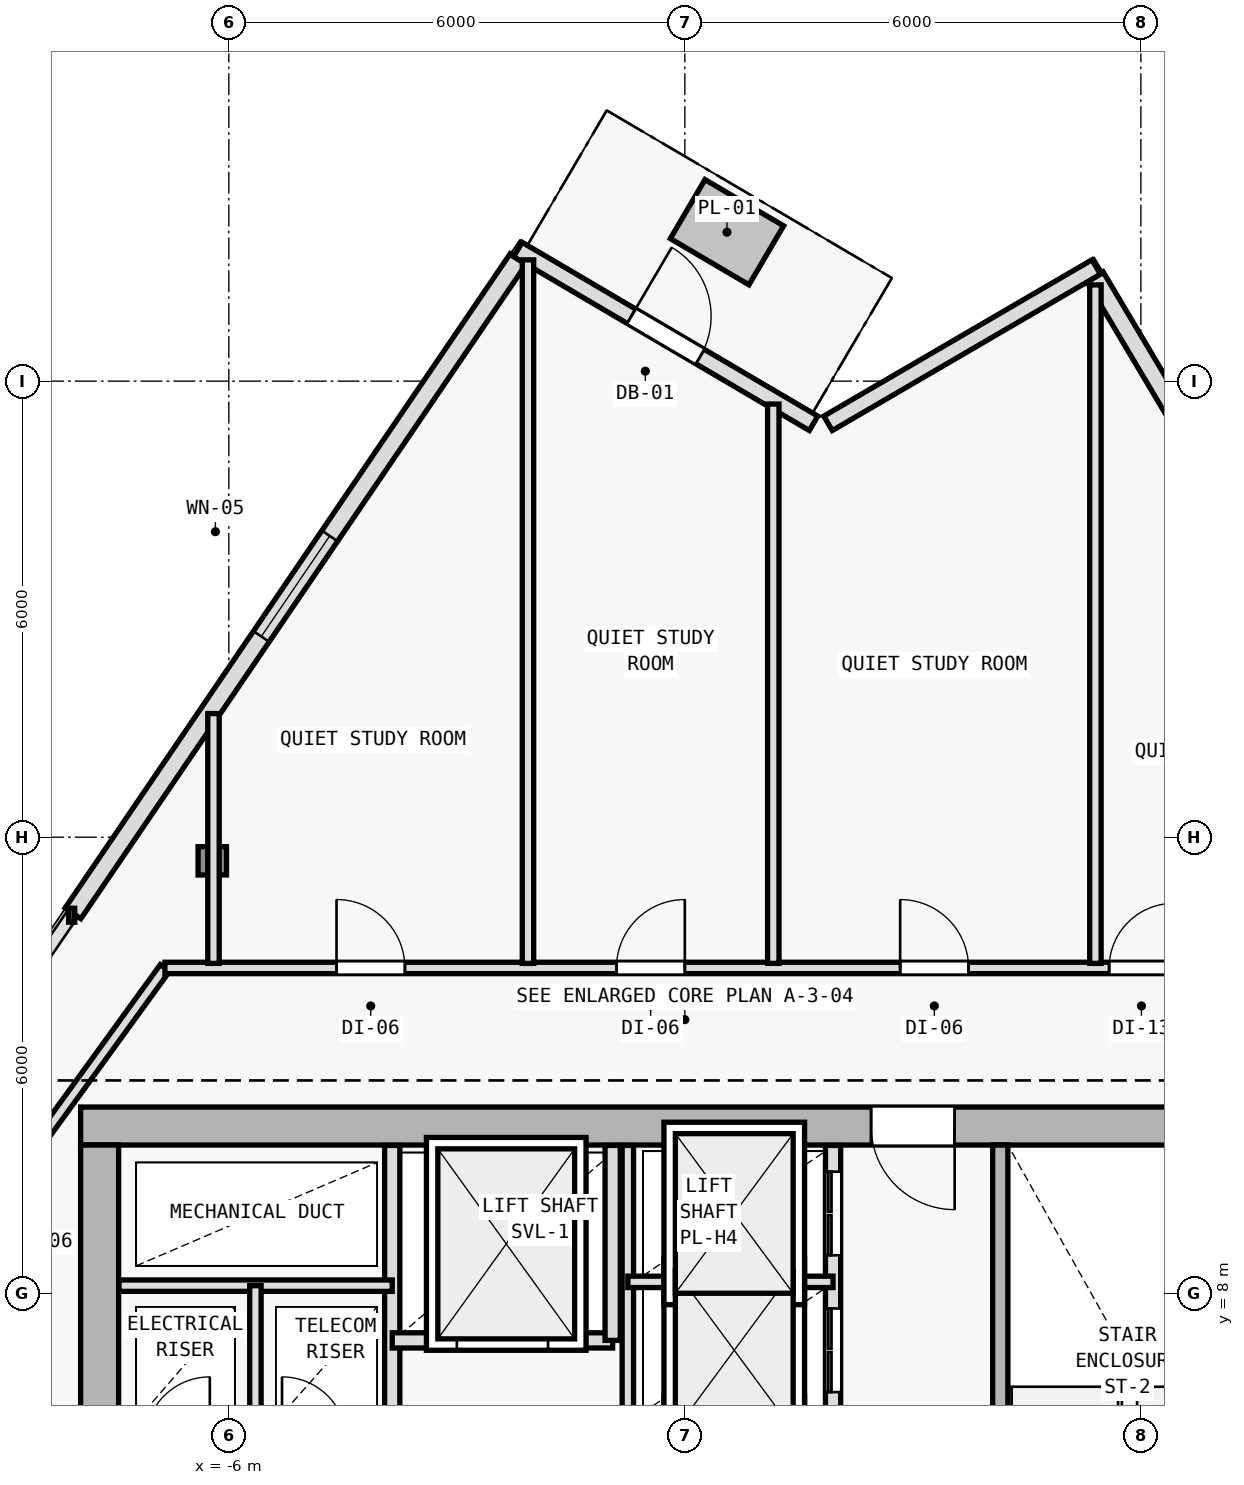
"""IFC4 building model, lengths in metres.
Left out: names, types, materials, properties, quantities, classifications, styles, units other than length and angle.
Written with IfcOpenShell. Run it as: python <this file> out.ifc"""

import sys

from ifc_helpers import new_model, si_unit, direction, frame, frame_2d, origin, origin_2d, place, context, subcontext, project, spatial, rectangle, i_section, extrude, element, fill, save


model = new_model("IFC4")
c1 = context("Model", 3, precision=1e-05, world=origin(), true_north=direction((0.0, 1.0)))
c2 = subcontext(c1, "Body", "Model", "MODEL_VIEW")
j1 = project(units=[si_unit("LENGTHUNIT", "METRE"), si_unit("PLANEANGLEUNIT", "RADIAN")], contexts=[c1])
p1 = place(None, origin())
s1 = spatial("IfcSite", under=j1, at=p1, CompositionType="ELEMENT")
p2 = place(p1, origin())
s2 = spatial("IfcBuilding", under=s1, at=p2, CompositionType="ELEMENT")
p3 = place(p2, frame((0.0, 0.0, 234.3)))
s3 = spatial("IfcBuildingStorey", under=s2, at=p3, CompositionType="ELEMENT", Elevation=234.3)
p4 = place(p3, frame((-7.7, 10.2, 0.0), z_axis=(0.0, 0.0, 1.0), x_axis=(1.0, 0.0, 0.0)))
e1 = element("IfcColumn", 1, at=p4, inside=s3, PredefinedType="COLUMN", context=c2, shape_type="SweptSolid", body=[
    extrude(i_section(OverallWidth=0.398, OverallDepth=0.387, WebThickness=0.013, FlangeThickness=0.022, FilletRadius=0.015, at=origin_2d()), origin(), (0.0, 0.0, 1.0), 3.6),
])
p5 = place(p3, frame((-6.218, 13.689, 0.005), z_axis=(0.008774546149, -0.002584750028, 0.999958162328), x_axis=(0.282568886397, 0.959247009086, 0.0)))
e2 = element("IfcColumn", 2, at=p5, inside=s3, PredefinedType="COLUMN", context=c2, shape_type="SweptSolid", body=[
    extrude(i_section(OverallWidth=0.374, OverallDepth=0.372, WebThickness=0.012, FlangeThickness=0.02, FilletRadius=0.015, at=origin_2d()), origin(), (0.0, 0.0, 1.0), 3.589),
])
p6 = place(p3, frame((5.396, 21.375, 0.0), z_axis=(0.0, 0.0, 1.0), x_axis=(0.511082771111, -0.85953150092, 0.0)))
e3 = element("IfcWall", 3, at=p6, inside=s3, PredefinedType="SOLIDWALL", context=c2, shape_type="SweptSolid", body=[
    extrude(rectangle(XDim=9.911, YDim=0.25, at=frame_2d((4.955, 0.0))), origin(), (0.0, 0.0, 1.0), 3.35),
])
p7 = place(p6, frame((4.505, 0.0, 0.62)))
e4 = element("IfcOpeningElement", 4, at=p7, cuts=e3, PredefinedType="OPENING", context=c2, shape_type="SweptSolid", body=[
    extrude(rectangle(XDim=0.9, YDim=1.6, at=frame_2d((0.45, 0.8))), frame((0.0, 0.135, 0.0), z_axis=(0.0, -1.0, 0.0), x_axis=(1.0, 0.0, 0.0)), (0.0, 0.0, 1.0), 0.27),
])
p8 = place(p3, frame((-8.05, 12.998, 0.0), z_axis=(0.0, 0.0, 1.0), x_axis=(0.562447281182, 0.826833148762, 0.0)))
e5 = element("IfcWall", 5, at=p8, inside=s3, PredefinedType="SOLIDWALL", context=c2, shape_type="SweptSolid", body=[
    extrude(rectangle(XDim=10.411, YDim=0.25, at=frame_2d((5.205, 0.0))), origin(), (0.0, 0.0, 1.0), 3.35),
])
p9 = place(p8, frame((4.405, 0.0, 0.62)))
e6 = element("IfcOpeningElement", 6, at=p9, cuts=e5, PredefinedType="OPENING", context=c2, shape_type="SweptSolid", body=[
    extrude(rectangle(XDim=1.6, YDim=2.1, at=frame_2d((0.8, 1.05))), frame((0.0, 0.135, 0.0), z_axis=(0.0, -1.0, 0.0), x_axis=(1.0, 0.0, 0.0)), (0.0, 0.0, 1.0), 0.27),
])
p10 = place(p3, frame((1.884, 19.445, 0.0), z_axis=(0.0, 0.0, 1.0), x_axis=(0.863969645804, 0.50354389196, 0.0)))
e7 = element("IfcWall", 7, at=p10, inside=s3, PredefinedType="SOLIDWALL", context=c2, shape_type="SweptSolid", body=[
    extrude(rectangle(XDim=4.084, YDim=0.22, at=frame_2d((2.042, 0.0))), origin(), (0.0, 0.0, 1.0), 3.35),
])
p11 = place(p3, frame((-2.197, 21.732, 0.0), z_axis=(0.0, 0.0, 1.0), x_axis=(0.862121926844, -0.506700881442, 0.0)))
e8 = element("IfcWall", 8, at=p11, inside=s3, PredefinedType="SOLIDWALL", context=c2, shape_type="SweptSolid", body=[
    extrude(rectangle(XDim=4.512, YDim=0.22, at=frame_2d((2.256, 0.0))), origin(), (0.0, 0.0, 1.0), 3.35),
])
p12 = place(p11, frame((1.731, 0.0, 0.0)))
e9 = element("IfcOpeningElement", 9, at=p12, cuts=e8, PredefinedType="OPENING", context=c2, shape_type="SweptSolid", body=[
    extrude(rectangle(XDim=1.05, YDim=2.15, at=frame_2d((0.525, 1.075))), frame((0.0, 0.12, 0.0), z_axis=(0.0, -1.0, 0.0), x_axis=(1.0, 0.0, 0.0)), (0.0, 0.0, 1.0), 0.24),
])
p13 = place(p3, frame((7.95, 10.2, 0.0), z_axis=(0.0, 0.0, 1.0), x_axis=(-1.0, 0.0, 0.0)))
e10 = element("IfcWall", 10, at=p13, inside=s3, PredefinedType="SHEAR", context=c2, shape_type="SweptSolid", body=[
    extrude(rectangle(XDim=15.9, YDim=0.5, at=frame_2d((7.95, 0.0))), origin(), (0.0, 0.0, 1.0), 3.35),
])
p14 = place(p13, frame((4.4, 0.0, 0.0)))
e11 = element("IfcOpeningElement", 11, at=p14, cuts=e10, PredefinedType="OPENING", context=c2, shape_type="SweptSolid", body=[
    extrude(rectangle(XDim=1.1, YDim=2.15, at=frame_2d((0.55, 1.075))), frame((0.0, 0.26, 0.0), z_axis=(0.0, -1.0, 0.0), x_axis=(1.0, 0.0, 0.0)), (0.0, 0.0, 1.0), 0.52),
])
p15 = place(p3, frame((-7.7, -9.15, 0.0), z_axis=(0.0, 0.0, 1.0), x_axis=(0.0, 1.0, 0.0)))
e12 = element("IfcWall", 12, at=p15, inside=s3, PredefinedType="SHEAR", context=c2, shape_type="SweptSolid", body=[
    extrude(rectangle(XDim=19.1, YDim=0.5, at=frame_2d((9.55, 0.0))), origin(), (0.0, 0.0, 1.0), 3.35),
])
p16 = place(p15, frame((12.7, 0.0, 0.0)))
e13 = element("IfcOpeningElement", 13, at=p16, cuts=e12, PredefinedType="OPENING", context=c2, shape_type="SweptSolid", body=[
    extrude(rectangle(XDim=1.1, YDim=2.15, at=frame_2d((0.55, 1.075))), frame((0.0, 0.26, 0.0), z_axis=(0.0, -1.0, 0.0), x_axis=(1.0, 0.0, 0.0)), (0.0, 0.0, 1.0), 0.52),
])
p17 = place(p3, frame((-3.85, 1.35, 0.0), z_axis=(0.0, 0.0, 1.0), x_axis=(0.0, 1.0, 0.0)))
e14 = element("IfcWall", 14, at=p17, inside=s3, PredefinedType="SOLIDWALL", context=c2, shape_type="SweptSolid", body=[
    extrude(rectangle(XDim=8.595, YDim=0.2, at=frame_2d((4.297, 0.0))), origin(), (0.0, 0.0, 1.0), 3.35),
])
p18 = place(p17, frame((1.5, 0.0, 0.0)))
e15 = element("IfcOpeningElement", 15, at=p18, cuts=e14, PredefinedType="OPENING", context=c2, shape_type="SweptSolid", body=[
    extrude(rectangle(XDim=1.0, YDim=2.15, at=frame_2d((0.5, 1.075))), frame((0.0, 0.11, 0.0), z_axis=(0.0, -1.0, 0.0), x_axis=(1.0, 0.0, 0.0)), (0.0, 0.0, 1.0), 0.22),
])
p19 = place(p17, frame((3.18, 0.0, 0.0)))
e16 = element("IfcOpeningElement", 16, at=p19, cuts=e14, PredefinedType="OPENING", context=c2, shape_type="SweptSolid", body=[
    extrude(rectangle(XDim=1.0, YDim=2.15, at=frame_2d((0.5, 1.075))), frame((0.0, 0.11, 0.0), z_axis=(0.0, -1.0, 0.0), x_axis=(1.0, 0.0, 0.0)), (0.0, 0.0, 1.0), 0.22),
])
p20 = place(p3, frame((-7.445, 8.1, 0.0), z_axis=(0.0, 0.0, 1.0), x_axis=(1.0, 0.0, 0.0)))
e17 = element("IfcWall", 17, at=p20, inside=s3, PredefinedType="PARTITIONING", context=c2, shape_type="SweptSolid", body=[
    extrude(rectangle(XDim=3.595, YDim=0.15, at=frame_2d((1.797, 0.0))), origin(), (0.0, 0.0, 1.0), 3.35),
])
p21 = place(p3, frame((-5.65, 6.05, 0.0), z_axis=(0.0, 0.0, 1.0), x_axis=(0.0, 1.0, 0.0)))
e18 = element("IfcWall", 18, at=p21, inside=s3, PredefinedType="PARTITIONING", context=c2, shape_type="SweptSolid", body=[
    extrude(rectangle(XDim=2.05, YDim=0.15, at=frame_2d((1.025, 0.0))), origin(), (0.0, 0.0, 1.0), 3.35),
])
p22 = place(p3, frame((4.15, 2.75, 0.0), z_axis=(0.0, 0.0, 1.0), x_axis=(0.0, 1.0, 0.0)))
e19 = element("IfcWall", 19, at=p22, inside=s3, PredefinedType="SOLIDWALL", context=c2, shape_type="SweptSolid", body=[
    extrude(rectangle(XDim=7.2, YDim=0.2, at=frame_2d((3.6, 0.0))), origin(), (0.0, 0.0, 1.0), 3.35),
])
p23 = place(p22, frame((0.35, 0.0, 0.0)))
e20 = element("IfcOpeningElement", 20, at=p23, cuts=e19, PredefinedType="OPENING", context=c2, shape_type="SweptSolid", body=[
    extrude(rectangle(XDim=1.0, YDim=2.15, at=frame_2d((0.5, 1.075))), frame((0.0, 0.11, 0.0), z_axis=(0.0, -1.0, 0.0), x_axis=(1.0, 0.0, 0.0)), (0.0, 0.0, 1.0), 0.22),
])
p24 = place(p3, frame((-3.85, 7.38, 0.0), z_axis=(0.0, 0.0, 1.0), x_axis=(1.0, 0.0, 0.0)))
e21 = element("IfcWall", 21, at=p24, inside=s3, PredefinedType="SOLIDWALL", context=c2, shape_type="SweptSolid", body=[
    extrude(rectangle(XDim=2.9, YDim=0.2, at=frame_2d((1.45, 0.0))), origin(), (0.0, 0.0, 1.0), 3.35),
])
p25 = place(p24, frame((0.85, 0.0, 0.0)))
e22 = element("IfcOpeningElement", 22, at=p25, cuts=e21, PredefinedType="OPENING", context=c2, shape_type="SweptSolid", body=[
    extrude(rectangle(XDim=1.2, YDim=2.2, at=frame_2d((0.6, 1.1))), frame((0.0, 0.11, 0.0), z_axis=(0.0, -1.0, 0.0), x_axis=(1.0, 0.0, 0.0)), (0.0, 0.0, 1.0), 0.22),
])
p26 = place(p3, frame((-0.95, 7.38, 0.0), z_axis=(0.0, 0.0, 1.0), x_axis=(0.0, 1.0, 0.0)))
e23 = element("IfcWall", 23, at=p26, inside=s3, PredefinedType="SOLIDWALL", context=c2, shape_type="SweptSolid", body=[
    extrude(rectangle(XDim=2.565, YDim=0.2, at=frame_2d((1.283, 0.0))), origin(), (0.0, 0.0, 1.0), 3.35),
])
p27 = place(p3, frame((1.95, 2.65, 0.0), z_axis=(0.0, 0.0, 1.0), x_axis=(0.0, 1.0, 0.0)))
e24 = element("IfcWall", 24, at=p27, inside=s3, PredefinedType="SOLIDWALL", context=c2, shape_type="SweptSolid", body=[
    extrude(rectangle(XDim=7.295, YDim=0.2, at=frame_2d((3.647, 0.0))), origin(), (0.0, 0.0, 1.0), 3.35),
])
p28 = place(p27, frame((0.45, 0.0, 0.0)))
e25 = element("IfcOpeningElement", 25, at=p28, cuts=e24, PredefinedType="OPENING", context=c2, shape_type="SweptSolid", body=[
    extrude(rectangle(XDim=1.1, YDim=2.15, at=frame_2d((0.55, 1.075))), frame((0.0, 0.11, 0.0), z_axis=(0.0, -1.0, 0.0), x_axis=(1.0, 0.0, 0.0)), (0.0, 0.0, 1.0), 0.22),
])
p29 = place(p27, frame((2.25, 0.0, 0.0)))
e26 = element("IfcOpeningElement", 26, at=p29, cuts=e24, PredefinedType="OPENING", context=c2, shape_type="SweptSolid", body=[
    extrude(rectangle(XDim=1.1, YDim=2.15, at=frame_2d((0.55, 1.075))), frame((0.0, 0.11, 0.0), z_axis=(0.0, -1.0, 0.0), x_axis=(1.0, 0.0, 0.0)), (0.0, 0.0, 1.0), 0.22),
])
p30 = place(p27, frame((4.05, 0.0, 0.0)))
e27 = element("IfcOpeningElement", 27, at=p30, cuts=e24, PredefinedType="OPENING", context=c2, shape_type="SweptSolid", body=[
    extrude(rectangle(XDim=1.1, YDim=2.15, at=frame_2d((0.55, 1.075))), frame((0.0, 0.11, 0.0), z_axis=(0.0, -1.0, 0.0), x_axis=(1.0, 0.0, 0.0)), (0.0, 0.0, 1.0), 0.22),
])
p31 = place(p27, frame((5.85, 0.0, 0.0)))
e28 = element("IfcOpeningElement", 28, at=p31, cuts=e24, PredefinedType="OPENING", context=c2, shape_type="SweptSolid", body=[
    extrude(rectangle(XDim=1.1, YDim=2.15, at=frame_2d((0.55, 1.075))), frame((0.0, 0.11, 0.0), z_axis=(0.0, -1.0, 0.0), x_axis=(1.0, 0.0, 0.0)), (0.0, 0.0, 1.0), 0.22),
])
p32 = place(p3, frame((-0.75, 5.92, 0.0), z_axis=(0.0, 0.0, 1.0), x_axis=(0.0, 1.0, 0.0)))
e29 = element("IfcWall", 29, at=p32, inside=s3, PredefinedType="PARTITIONING", context=c2, shape_type="SweptSolid", body=[
    extrude(rectangle(XDim=4.025, YDim=0.15, at=frame_2d((2.013, 0.0))), origin(), (0.0, 0.0, 1.0), 3.35),
])
p33 = place(p3, frame((-0.75, 8.15, 0.0), z_axis=(0.0, 0.0, 1.0), x_axis=(1.0, 0.0, 0.0)))
e30 = element("IfcWall", 30, at=p33, inside=s3, PredefinedType="PARTITIONING", context=c2, shape_type="SweptSolid", body=[
    extrude(rectangle(XDim=2.7, YDim=0.15, at=frame_2d((1.35, 0.0))), origin(), (0.0, 0.0, 1.0), 3.35),
])
p34 = place(p3, frame((-9.78, 8.226, 0.0), z_axis=(0.0, 0.0, 1.0), x_axis=(0.586956386413, 0.809618552436, 0.0)))
e31 = element("IfcWall", 31, at=p34, inside=s3, PredefinedType="PARTITIONING", context=c2, shape_type="SweptSolid", body=[
    extrude(rectangle(XDim=5.008, YDim=0.15, at=frame_2d((2.504, 0.0))), origin(), (0.0, 0.0, 1.0), 2.975),
])
p35 = place(p34, frame((1.154, 0.0, 0.0)))
e32 = element("IfcOpeningElement", 32, at=p35, cuts=e31, PredefinedType="OPENING", context=c2, shape_type="SweptSolid", body=[
    extrude(rectangle(XDim=0.9, YDim=2.1, at=frame_2d((0.45, 1.05))), frame((0.0, 0.085, 0.0), z_axis=(0.0, -1.0, 0.0), x_axis=(1.0, 0.0, 0.0)), (0.0, 0.0, 1.0), 0.17),
])
p36 = place(p3, frame((-6.841, 12.28, 0.0), z_axis=(0.0, 0.0, 1.0), x_axis=(1.0, 0.0, 0.0)))
e33 = element("IfcWall", 33, at=p36, inside=s3, PredefinedType="PARTITIONING", context=c2, shape_type="SweptSolid", body=[
    extrude(rectangle(XDim=13.682, YDim=0.15, at=frame_2d((6.841, 0.0))), origin(), (0.0, 0.0, 1.0), 2.975),
])
p37 = place(p36, frame((12.423, 0.0, 0.0)))
e34 = element("IfcOpeningElement", 34, at=p37, cuts=e33, PredefinedType="OPENING", context=c2, shape_type="SweptSolid", body=[
    extrude(rectangle(XDim=0.85, YDim=2.1, at=frame_2d((0.425, 1.05))), frame((0.0, 0.085, 0.0), z_axis=(0.0, -1.0, 0.0), x_axis=(1.0, 0.0, 0.0)), (0.0, 0.0, 1.0), 0.17),
])
p38 = place(p36, frame((9.674, 0.0, 0.0)))
e35 = element("IfcOpeningElement", 35, at=p38, cuts=e33, PredefinedType="OPENING", context=c2, shape_type="SweptSolid", body=[
    extrude(rectangle(XDim=0.9, YDim=2.1, at=frame_2d((0.45, 1.05))), frame((0.0, 0.085, 0.0), z_axis=(0.0, -1.0, 0.0), x_axis=(1.0, 0.0, 0.0)), (0.0, 0.0, 1.0), 0.17),
])
p39 = place(p36, frame((5.941, 0.0, 0.0)))
e36 = element("IfcOpeningElement", 36, at=p39, cuts=e33, PredefinedType="OPENING", context=c2, shape_type="SweptSolid", body=[
    extrude(rectangle(XDim=0.9, YDim=2.1, at=frame_2d((0.45, 1.05))), frame((0.0, 0.085, 0.0), z_axis=(0.0, -1.0, 0.0), x_axis=(1.0, 0.0, 0.0)), (0.0, 0.0, 1.0), 0.17),
])
p40 = place(p36, frame((2.258, 0.0, 0.0)))
e37 = element("IfcOpeningElement", 37, at=p40, cuts=e33, PredefinedType="OPENING", context=c2, shape_type="SweptSolid", body=[
    extrude(rectangle(XDim=0.9, YDim=2.1, at=frame_2d((0.45, 1.05))), frame((0.0, 0.085, 0.0), z_axis=(0.0, -1.0, 0.0), x_axis=(1.0, 0.0, 0.0)), (0.0, 0.0, 1.0), 0.17),
])
p41 = place(p3, frame((-6.202, 12.34, 0.0), z_axis=(0.0, 0.0, 1.0), x_axis=(0.0, 1.0, 0.0)))
e38 = element("IfcWall", 38, at=p41, inside=s3, PredefinedType="PARTITIONING", context=c2, shape_type="SweptSolid", body=[
    extrude(rectangle(XDim=3.287, YDim=0.15, at=frame_2d((1.644, 0.0))), origin(), (0.0, 0.0, 1.0), 2.975),
])
p42 = place(p3, frame((1.164, 12.34, 0.0), z_axis=(0.0, 0.0, 1.0), x_axis=(0.0, 1.0, 0.0)))
e39 = element("IfcWall", 39, at=p42, inside=s3, PredefinedType="PARTITIONING", context=c2, shape_type="SweptSolid", body=[
    extrude(rectangle(XDim=7.359, YDim=0.15, at=frame_2d((3.679, 0.0))), origin(), (0.0, 0.0, 1.0), 2.975),
])
p43 = place(p3, frame((5.402, 12.34, 0.0), z_axis=(0.0, 0.0, 1.0), x_axis=(0.0, 1.0, 0.0)))
e40 = element("IfcWall", 40, at=p43, inside=s3, PredefinedType="PARTITIONING", context=c2, shape_type="SweptSolid", body=[
    extrude(rectangle(XDim=8.926, YDim=0.15, at=frame_2d((4.463, 0.0))), origin(), (0.0, 0.0, 1.0), 2.975),
])
p44 = place(p3, frame((-2.064, 12.34, 0.0), z_axis=(0.0, 0.0, 1.0), x_axis=(0.0, 1.0, 0.0)))
e41 = element("IfcWall", 41, at=p44, inside=s3, PredefinedType="PARTITIONING", context=c2, shape_type="SweptSolid", body=[
    extrude(rectangle(XDim=9.256, YDim=0.15, at=frame_2d((4.628, 0.0))), origin(), (0.0, 0.0, 1.0), 2.975),
])
p45 = place(p9, origin())
e42 = element("IfcWindow", 42, at=p45, inside=s3, PartitioningType="SINGLE_PANEL", PredefinedType="WINDOW", context=c2, shape_type="SweptSolid", body=[
    extrude(rectangle(XDim=1.6, YDim=2.1, at=frame_2d((0.8, 1.05))), frame((0.0, 0.03, 0.0), z_axis=(0.0, -1.0, 0.0), x_axis=(1.0, 0.0, 0.0)), (0.0, 0.0, 1.0), 0.06),
])
fill(e6, e42)
p46 = place(p12, origin())
e43 = element("IfcDoor", 43, at=p46, inside=s3, OperationType="SINGLE_SWING_LEFT", PredefinedType="DOOR", context=c2, shape_type="SweptSolid", body=[
    extrude(rectangle(XDim=1.05, YDim=2.15, at=frame_2d((0.525, 1.075))), frame((0.0, 0.025, 0.0), z_axis=(0.0, -1.0, 0.0), x_axis=(1.0, 0.0, 0.0)), (0.0, 0.0, 1.0), 0.05),
])
fill(e9, e43)
p47 = place(p14, origin())
e44 = element("IfcDoor", 44, at=p47, inside=s3, OperationType="SINGLE_SWING_LEFT", PredefinedType="DOOR", context=c2, shape_type="SweptSolid", body=[
    extrude(rectangle(XDim=1.1, YDim=2.15, at=frame_2d((0.55, 1.075))), frame((0.0, 0.025, 0.0), z_axis=(0.0, -1.0, 0.0), x_axis=(1.0, 0.0, 0.0)), (0.0, 0.0, 1.0), 0.05),
])
fill(e11, e44)
p48 = place(p25, origin())
e45 = element("IfcDoor", 45, at=p48, inside=s3, OperationType="DOUBLE_DOOR_SLIDING", PredefinedType="DOOR", context=c2, shape_type="SweptSolid", body=[
    extrude(rectangle(XDim=1.2, YDim=2.2, at=frame_2d((0.6, 1.1))), frame((0.0, 0.025, 0.0), z_axis=(0.0, -1.0, 0.0), x_axis=(1.0, 0.0, 0.0)), (0.0, 0.0, 1.0), 0.05),
])
fill(e22, e45)
p49 = place(p30, origin())
e46 = element("IfcDoor", 46, at=p49, inside=s3, OperationType="DOUBLE_DOOR_SLIDING", PredefinedType="DOOR", context=c2, shape_type="SweptSolid", body=[
    extrude(rectangle(XDim=1.1, YDim=2.15, at=frame_2d((0.55, 1.075))), frame((0.0, 0.025, 0.0), z_axis=(0.0, -1.0, 0.0), x_axis=(1.0, 0.0, 0.0)), (0.0, 0.0, 1.0), 0.05),
])
fill(e27, e46)
p50 = place(p31, origin())
e47 = element("IfcDoor", 47, at=p50, inside=s3, OperationType="DOUBLE_DOOR_SLIDING", PredefinedType="DOOR", context=c2, shape_type="SweptSolid", body=[
    extrude(rectangle(XDim=1.1, YDim=2.15, at=frame_2d((0.55, 1.075))), frame((0.0, 0.025, 0.0), z_axis=(0.0, -1.0, 0.0), x_axis=(1.0, 0.0, 0.0)), (0.0, 0.0, 1.0), 0.05),
])
fill(e28, e47)
p51 = place(p37, origin())
e48 = element("IfcDoor", 48, at=p51, inside=s3, OperationType="SINGLE_SWING_RIGHT", PredefinedType="DOOR", context=c2, shape_type="SweptSolid", body=[
    extrude(rectangle(XDim=0.85, YDim=2.1, at=frame_2d((0.425, 1.05))), frame((0.0, 0.025, 0.0), z_axis=(0.0, -1.0, 0.0), x_axis=(1.0, 0.0, 0.0)), (0.0, 0.0, 1.0), 0.05),
])
fill(e34, e48)
p52 = place(p38, origin())
e49 = element("IfcDoor", 49, at=p52, inside=s3, OperationType="SINGLE_SWING_LEFT", PredefinedType="DOOR", context=c2, shape_type="SweptSolid", body=[
    extrude(rectangle(XDim=0.9, YDim=2.1, at=frame_2d((0.45, 1.05))), frame((0.0, 0.025, 0.0), z_axis=(0.0, -1.0, 0.0), x_axis=(1.0, 0.0, 0.0)), (0.0, 0.0, 1.0), 0.05),
])
fill(e35, e49)
p53 = place(p39, origin())
e50 = element("IfcDoor", 50, at=p53, inside=s3, OperationType="SINGLE_SWING_RIGHT", PredefinedType="DOOR", context=c2, shape_type="SweptSolid", body=[
    extrude(rectangle(XDim=0.9, YDim=2.1, at=frame_2d((0.45, 1.05))), frame((0.0, 0.025, 0.0), z_axis=(0.0, -1.0, 0.0), x_axis=(1.0, 0.0, 0.0)), (0.0, 0.0, 1.0), 0.05),
])
fill(e36, e50)
p54 = place(p40, origin())
e51 = element("IfcDoor", 51, at=p54, inside=s3, OperationType="SINGLE_SWING_LEFT", PredefinedType="DOOR", context=c2, shape_type="SweptSolid", body=[
    extrude(rectangle(XDim=0.9, YDim=2.1, at=frame_2d((0.45, 1.05))), frame((0.0, 0.025, 0.0), z_axis=(0.0, -1.0, 0.0), x_axis=(1.0, 0.0, 0.0)), (0.0, 0.0, 1.0), 0.05),
])
fill(e37, e51)
save(model, sys.argv[1])
